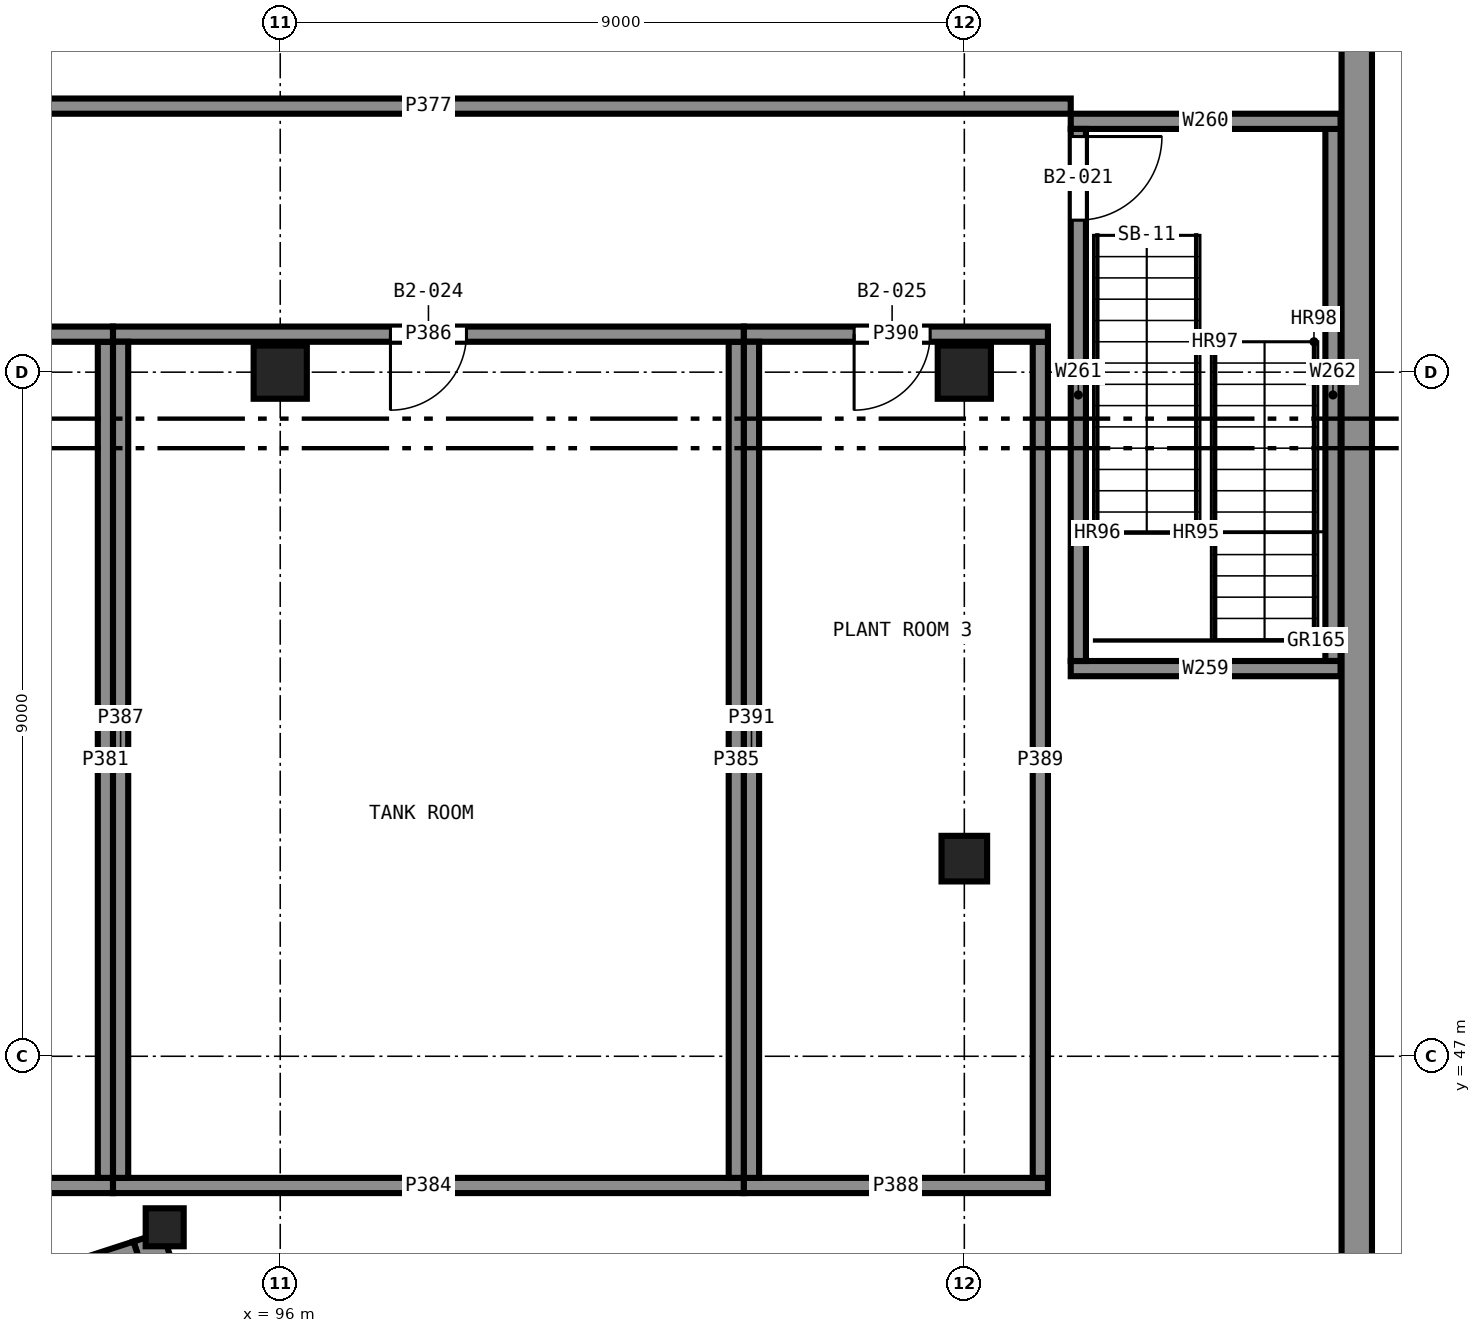
"""IFC4 building model, lengths in metres.
Left out: names, types, materials, properties, quantities, classifications, styles, units other than length and angle.
Written with IfcOpenShell. Run it as: python <this file> out.ifc"""

import sys

from ifc_helpers import new_model, si_unit, direction, frame, frame_2d, origin, origin_2d, place, context, subcontext, project, spatial, rectangle, extrude, element, fill, save


model = new_model("IFC4")
c1 = context("Model", 3, precision=1e-05, world=origin(), true_north=direction((0.0, 1.0)))
c2 = subcontext(c1, "Body", "Model", "MODEL_VIEW")
j1 = project(units=[si_unit("LENGTHUNIT", "METRE"), si_unit("PLANEANGLEUNIT", "RADIAN")], contexts=[c1])
p1 = place(None, origin())
s1 = spatial("IfcSite", under=j1, at=p1, CompositionType="ELEMENT")
p2 = place(p1, origin())
s2 = spatial("IfcBuilding", under=s1, at=p2, CompositionType="ELEMENT")
p3 = place(p2, frame((0.0, 0.0, -10.0)))
s3 = spatial("IfcBuildingStorey", under=s2, at=p3, CompositionType="ELEMENT", Elevation=-10.0)
for number, where, z_axis, x_axis in (
    (1, (106.4, 52.1, 0.0), (0.0, 0.0, 1.0), (1.0, 0.0, 0.0)),
    (2, (109.95, 59.3, 0.0), (0.0, 0.0, 1.0), (-1.0, 0.0, 0.0)),
):
    element("IfcWall", number, at=place(p3, frame(where, z_axis=z_axis, x_axis=x_axis)), inside=s3, PredefinedType="SHEAR", context=c2, shape_type="SweptSolid", body=[
        extrude(rectangle(XDim=3.55, YDim=0.2, at=frame_2d((1.775, 0.0))), origin(), (0.0, 0.0, 1.0), 5.0),
    ])
p4 = place(p3, frame((106.5, 59.2, 0.0), z_axis=(0.0, 0.0, 1.0), x_axis=(0.0, -1.0, 0.0)))
e3 = element("IfcWall", 3, at=p4, inside=s3, PredefinedType="SHEAR", context=c2, shape_type="SweptSolid", body=[
    extrude(rectangle(XDim=7.0, YDim=0.2, at=frame_2d((3.5, 0.0))), origin(), (0.0, 0.0, 1.0), 5.0),
])
p5 = place(p4, frame((0.1, 0.0, 0.0)))
e4 = element("IfcOpeningElement", 4, at=p5, cuts=e3, PredefinedType="OPENING", context=c2, shape_type="SweptSolid", body=[
    extrude(rectangle(XDim=1.1, YDim=2.1, at=frame_2d((0.55, 1.05))), frame((0.0, 0.11, 0.0), z_axis=(0.0, -1.0, 0.0), x_axis=(1.0, 0.0, 0.0)), (0.0, 0.0, 1.0), 0.22),
])
p6 = place(p3, frame((109.85, 52.2, 0.0), z_axis=(0.0, 0.0, 1.0), x_axis=(0.0, 1.0, 0.0)))
e5 = element("IfcWall", 5, at=p6, inside=s3, PredefinedType="SHEAR", context=c2, shape_type="SweptSolid", body=[
    extrude(rectangle(XDim=7.0, YDim=0.2, at=frame_2d((3.5, 0.0))), origin(), (0.0, 0.0, 1.0), 5.0),
])
p7 = place(p3, frame((95.33, 41.329, 0.0), z_axis=(0.0, 0.0, 1.0), x_axis=(-0.309031903466, 0.951051671908, 0.0)))
e6 = element("IfcWall", 6, at=p7, inside=s3, PredefinedType="SHEAR", context=c2, shape_type="SweptSolid", body=[
    extrude(rectangle(XDim=3.465, YDim=0.4, at=frame_2d((1.732, 0.0))), origin(), (0.0, 0.0, 1.0), 4.7),
])
p8 = place(p3, frame((94.131, 44.372, 0.0), z_axis=(0.0, 0.0, 1.0), x_axis=(-0.951055646044, -0.309019672719, 0.0)))
e7 = element("IfcWall", 7, at=p8, inside=s3, PredefinedType="SHEAR", context=c2, shape_type="SweptSolid", body=[
    extrude(rectangle(XDim=5.321, YDim=0.4, at=frame_2d((2.661, 0.0))), origin(), (0.0, 0.0, 1.0), 4.7),
])
p9 = place(p3, frame((110.163, 79.587, 0.0), z_axis=(0.0, 0.0, 1.0), x_axis=(0.0, -1.0, 0.0)))
e8 = element("IfcWall", 8, at=p9, inside=s3, PredefinedType="SHEAR", context=c2, shape_type="SweptSolid", body=[
    extrude(rectangle(XDim=36.826, YDim=0.4, at=frame_2d((18.413, 0.0))), origin(), (0.0, 0.0, 1.0), 4.7),
])
for number, where, z_axis, x_axis in (
    (9, (96.0, 56.0, 0.0), (0.0, 0.0, 1.0), (1.0, 0.0, 0.0)),
    (10, (105.0, 56.0, 0.0), (0.0, 0.0, 1.0), (1.0, 0.0, 0.0)),
):
    element("IfcColumn", number, at=place(p3, frame(where, z_axis=z_axis, x_axis=x_axis)), inside=s3, PredefinedType="COLUMN", context=c2, shape_type="SweptSolid", body=[
        extrude(rectangle(XDim=0.7, YDim=0.7, at=origin_2d()), origin(), (0.0, 0.0, 1.0), 5.0),
    ])
p10 = place(p3, frame((94.48, 44.75, 0.0), z_axis=(0.0, 0.0, 1.0), x_axis=(1.0, 0.0, 0.0)))
e11 = element("IfcColumn", 11, at=p10, inside=s3, PredefinedType="COLUMN", context=c2, shape_type="SweptSolid", body=[
    extrude(rectangle(XDim=0.5, YDim=0.5, at=origin_2d()), origin(), (0.0, 0.0, 1.0), 5.0),
])
p11 = place(p3, frame((105.0, 49.6, 0.0), z_axis=(0.0, 0.0, 1.0), x_axis=(1.0, 0.0, 0.0)))
e12 = element("IfcColumn", 12, at=p11, inside=s3, PredefinedType="COLUMN", context=c2, shape_type="SweptSolid", body=[
    extrude(rectangle(XDim=0.6, YDim=0.6, at=origin_2d()), origin(), (0.0, 0.0, 1.0), 5.0),
])
p12 = place(p3, frame((85.2, 45.3, 0.0), z_axis=(0.0, 0.0, 1.0), x_axis=(1.0, 0.0, 0.0)))
e13 = element("IfcWall", 13, at=p12, inside=s3, PredefinedType="PARTITIONING", context=c2, shape_type="SweptSolid", body=[
    extrude(rectangle(XDim=8.6, YDim=0.2, at=frame_2d((4.3, 0.0))), origin(), (0.0, 0.0, 1.0), 4.7),
])
p13 = place(p3, frame((93.7, 45.4, 0.0), z_axis=(0.0, 0.0, 1.0), x_axis=(0.0, 1.0, 0.0)))
e14 = element("IfcWall", 14, at=p13, inside=s3, PredefinedType="PARTITIONING", context=c2, shape_type="SweptSolid", body=[
    extrude(rectangle(XDim=11.0, YDim=0.2, at=frame_2d((5.5, 0.0))), origin(), (0.0, 0.0, 1.0), 4.7),
])
p14 = place(p3, frame((93.8, 56.5, 0.0), z_axis=(0.0, 0.0, 1.0), x_axis=(-1.0, 0.0, 0.0)))
e15 = element("IfcWall", 15, at=p14, inside=s3, PredefinedType="PARTITIONING", context=c2, shape_type="SweptSolid", body=[
    extrude(rectangle(XDim=8.6, YDim=0.2, at=frame_2d((4.3, 0.0))), origin(), (0.0, 0.0, 1.0), 4.7),
])
p15 = place(p14, frame((3.8, 0.0, 0.0)))
e16 = element("IfcOpeningElement", 16, at=p15, cuts=e15, PredefinedType="OPENING", context=c2, shape_type="SweptSolid", body=[
    extrude(rectangle(XDim=1.0, YDim=2.1, at=frame_2d((0.5, 1.05))), frame((0.0, 0.11, 0.0), z_axis=(0.0, -1.0, 0.0), x_axis=(1.0, 0.0, 0.0)), (0.0, 0.0, 1.0), 0.22),
])
p16 = place(p3, frame((93.8, 45.3, 0.0), z_axis=(0.0, 0.0, 1.0), x_axis=(1.0, 0.0, 0.0)))
e17 = element("IfcWall", 17, at=p16, inside=s3, PredefinedType="PARTITIONING", context=c2, shape_type="SweptSolid", body=[
    extrude(rectangle(XDim=8.3, YDim=0.2, at=frame_2d((4.15, 0.0))), origin(), (0.0, 0.0, 1.0), 4.7),
])
p17 = place(p3, frame((102.0, 45.4, 0.0), z_axis=(0.0, 0.0, 1.0), x_axis=(0.0, 1.0, 0.0)))
e18 = element("IfcWall", 18, at=p17, inside=s3, PredefinedType="PARTITIONING", context=c2, shape_type="SweptSolid", body=[
    extrude(rectangle(XDim=11.0, YDim=0.2, at=frame_2d((5.5, 0.0))), origin(), (0.0, 0.0, 1.0), 4.7),
])
p18 = place(p3, frame((102.1, 56.5, 0.0), z_axis=(0.0, 0.0, 1.0), x_axis=(-1.0, 0.0, 0.0)))
e19 = element("IfcWall", 19, at=p18, inside=s3, PredefinedType="PARTITIONING", context=c2, shape_type="SweptSolid", body=[
    extrude(rectangle(XDim=8.3, YDim=0.2, at=frame_2d((4.15, 0.0))), origin(), (0.0, 0.0, 1.0), 4.7),
])
p19 = place(p18, frame((3.65, 0.0, 0.0)))
e20 = element("IfcOpeningElement", 20, at=p19, cuts=e19, PredefinedType="OPENING", context=c2, shape_type="SweptSolid", body=[
    extrude(rectangle(XDim=1.0, YDim=2.1, at=frame_2d((0.5, 1.05))), frame((0.0, 0.11, 0.0), z_axis=(0.0, -1.0, 0.0), x_axis=(1.0, 0.0, 0.0)), (0.0, 0.0, 1.0), 0.22),
])
p20 = place(p3, frame((93.9, 56.4, 0.0), z_axis=(0.0, 0.0, 1.0), x_axis=(0.0, -1.0, 0.0)))
e21 = element("IfcWall", 21, at=p20, inside=s3, PredefinedType="PARTITIONING", context=c2, shape_type="SweptSolid", body=[
    extrude(rectangle(XDim=11.0, YDim=0.2, at=frame_2d((5.5, 0.0))), origin(), (0.0, 0.0, 1.0), 4.7),
])
p21 = place(p3, frame((102.1, 45.3, 0.0), z_axis=(0.0, 0.0, 1.0), x_axis=(1.0, 0.0, 0.0)))
e22 = element("IfcWall", 22, at=p21, inside=s3, PredefinedType="PARTITIONING", context=c2, shape_type="SweptSolid", body=[
    extrude(rectangle(XDim=4.0, YDim=0.2, at=frame_2d((2.0, 0.0))), origin(), (0.0, 0.0, 1.0), 4.7),
])
p22 = place(p3, frame((106.0, 45.4, 0.0), z_axis=(0.0, 0.0, 1.0), x_axis=(0.0, 1.0, 0.0)))
e23 = element("IfcWall", 23, at=p22, inside=s3, PredefinedType="PARTITIONING", context=c2, shape_type="SweptSolid", body=[
    extrude(rectangle(XDim=11.0, YDim=0.2, at=frame_2d((5.5, 0.0))), origin(), (0.0, 0.0, 1.0), 4.7),
])
p23 = place(p3, frame((106.1, 56.5, 0.0), z_axis=(0.0, 0.0, 1.0), x_axis=(-1.0, 0.0, 0.0)))
e24 = element("IfcWall", 24, at=p23, inside=s3, PredefinedType="PARTITIONING", context=c2, shape_type="SweptSolid", body=[
    extrude(rectangle(XDim=4.0, YDim=0.2, at=frame_2d((2.0, 0.0))), origin(), (0.0, 0.0, 1.0), 4.7),
])
p24 = place(p23, frame((1.55, 0.0, 0.0)))
e25 = element("IfcOpeningElement", 25, at=p24, cuts=e24, PredefinedType="OPENING", context=c2, shape_type="SweptSolid", body=[
    extrude(rectangle(XDim=1.0, YDim=2.1, at=frame_2d((0.5, 1.05))), frame((0.0, 0.11, 0.0), z_axis=(0.0, -1.0, 0.0), x_axis=(1.0, 0.0, 0.0)), (0.0, 0.0, 1.0), 0.22),
])
p25 = place(p3, frame((102.2, 56.4, 0.0), z_axis=(0.0, 0.0, 1.0), x_axis=(0.0, -1.0, 0.0)))
e26 = element("IfcWall", 26, at=p25, inside=s3, PredefinedType="PARTITIONING", context=c2, shape_type="SweptSolid", body=[
    extrude(rectangle(XDim=11.0, YDim=0.2, at=frame_2d((5.5, 0.0))), origin(), (0.0, 0.0, 1.0), 4.7),
])
p26 = place(p3, frame((89.5, 59.5, 0.0), z_axis=(0.0, 0.0, 1.0), x_axis=(1.0, 0.0, 0.0)))
e27 = element("IfcWall", 27, at=p26, inside=s3, PredefinedType="PARTITIONING", context=c2, shape_type="SweptSolid", body=[
    extrude(rectangle(XDim=16.9, YDim=0.2, at=frame_2d((8.45, 0.0))), origin(), (0.0, 0.0, 1.0), 4.7),
])
p27 = place(p5, origin())
e28 = element("IfcDoor", 28, at=p27, inside=s3, OperationType="SINGLE_SWING_RIGHT", PredefinedType="DOOR", context=c2, shape_type="SweptSolid", body=[
    extrude(rectangle(XDim=1.1, YDim=2.1, at=frame_2d((0.55, 1.05))), frame((0.0, 0.025, 0.0), z_axis=(0.0, -1.0, 0.0), x_axis=(1.0, 0.0, 0.0)), (0.0, 0.0, 1.0), 0.05),
])
fill(e4, e28)
p28 = place(p19, origin())
e29 = element("IfcDoor", 29, at=p28, inside=s3, OperationType="SINGLE_SWING_LEFT", PredefinedType="DOOR", context=c2, shape_type="SweptSolid", body=[
    extrude(rectangle(XDim=1.0, YDim=2.1, at=frame_2d((0.5, 1.05))), frame((0.0, 0.025, 0.0), z_axis=(0.0, -1.0, 0.0), x_axis=(1.0, 0.0, 0.0)), (0.0, 0.0, 1.0), 0.05),
])
fill(e20, e29)
p29 = place(p24, origin())
e30 = element("IfcDoor", 30, at=p29, inside=s3, OperationType="SINGLE_SWING_LEFT", PredefinedType="DOOR", context=c2, shape_type="SweptSolid", body=[
    extrude(rectangle(XDim=1.0, YDim=2.1, at=frame_2d((0.5, 1.05))), frame((0.0, 0.025, 0.0), z_axis=(0.0, -1.0, 0.0), x_axis=(1.0, 0.0, 0.0)), (0.0, 0.0, 1.0), 0.05),
])
fill(e25, e30)
save(model, sys.argv[1])
